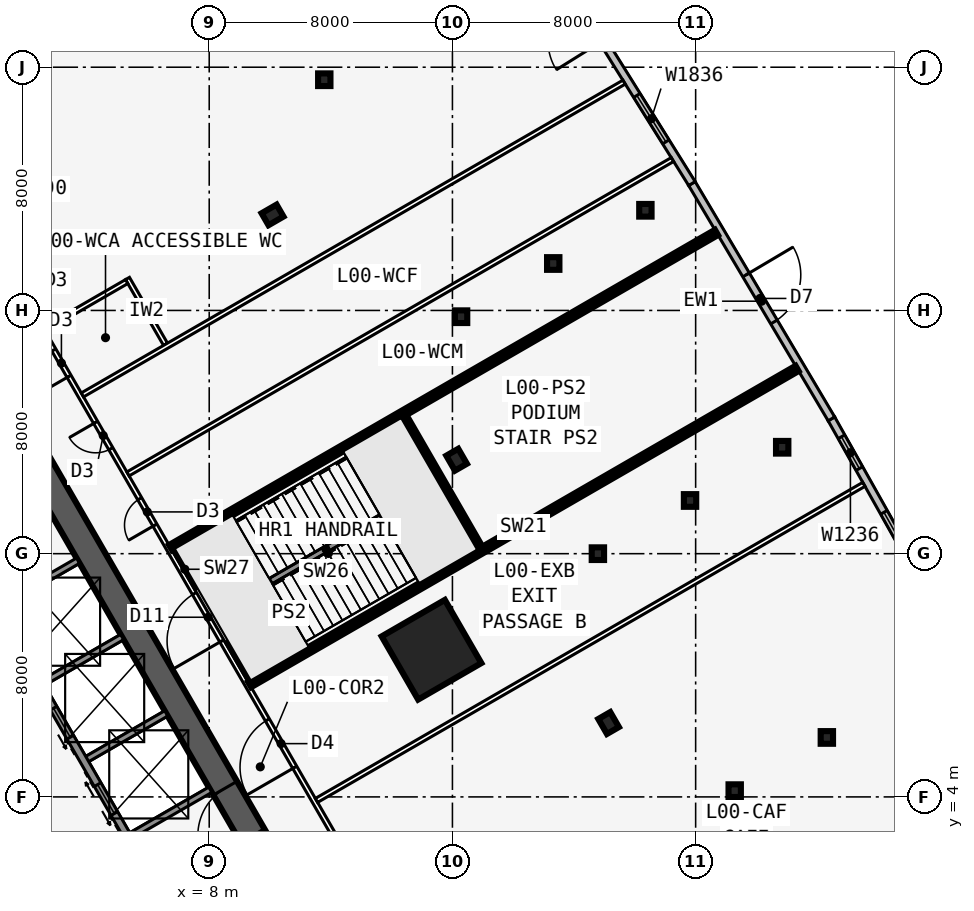
"""IFC4 building model, lengths in metres.
Left out: names, types, materials, properties, quantities, classifications, styles, units other than length and angle.
Written with IfcOpenShell. Run it as: python <this file> out.ifc"""

import sys

from ifc_helpers import new_model, si_unit, direction, frame, frame_2d, origin, origin_2d, place, context, subcontext, project, spatial, rectangle, i_section, extrude, element, fill, save


model = new_model("IFC4")
c1 = context("Model", 3, precision=1e-05, world=origin(), true_north=direction((0.0, 1.0)))
c2 = subcontext(c1, "Body", "Model", "MODEL_VIEW")
j1 = project(units=[si_unit("LENGTHUNIT", "METRE"), si_unit("PLANEANGLEUNIT", "RADIAN")], contexts=[c1])
p1 = place(None, origin())
s1 = spatial("IfcSite", under=j1, at=p1, CompositionType="ELEMENT")
p2 = place(p1, origin())
s2 = spatial("IfcBuilding", under=s1, at=p2, CompositionType="ELEMENT")
p3 = place(p2, origin())
s3 = spatial("IfcBuildingStorey", under=s2, at=p3, CompositionType="ELEMENT", Elevation=0.0)
p4 = place(p3, frame((16.5, -9.526, -0.3), z_axis=(0.0, 0.0, 1.0), x_axis=(-0.499999749417, 0.866025548458, 0.0)))
e1 = element("IfcWall", 1, at=p4, inside=s3, PredefinedType="SHEAR", context=c2, shape_type="SweptSolid", body=[
    extrude(rectangle(XDim=33.0, YDim=0.9, at=frame_2d((16.5, 0.0))), origin(), (0.0, 0.0, 1.0), 6.3),
])
p5 = place(p4, frame((14.15, 0.0, 0.3)))
e2 = element("IfcOpeningElement", 2, at=p5, cuts=e1, PredefinedType="OPENING", context=c2, shape_type="SweptSolid", body=[
    extrude(rectangle(XDim=1.8, YDim=2.13, at=frame_2d((0.9, 1.065))), frame((0.0, 0.46, 0.0), z_axis=(0.0, -1.0, 0.0), x_axis=(1.0, 0.0, 0.0)), (0.0, 0.0, 1.0), 0.92),
])
p6 = place(p4, frame((12.6, 0.0, 0.3)))
e3 = element("IfcOpeningElement", 3, at=p6, cuts=e1, PredefinedType="OPENING", context=c2, shape_type="SweptSolid", body=[
    extrude(rectangle(XDim=1.0, YDim=2.13, at=frame_2d((0.5, 1.065))), frame((0.0, 0.46, 0.0), z_axis=(0.0, -1.0, 0.0), x_axis=(1.0, 0.0, 0.0)), (0.0, 0.0, 1.0), 0.92),
])
p7 = place(p3, frame((5.379, 2.586, -0.3), z_axis=(0.0, 0.0, 1.0), x_axis=(-0.500001375892, 0.866024609411, 0.0)))
e4 = element("IfcWall", 4, at=p7, inside=s3, PredefinedType="SOLIDWALL", context=c2, shape_type="SweptSolid", body=[
    extrude(rectangle(XDim=10.633, YDim=0.25, at=frame_2d((5.316, 0.0))), origin(), (0.0, 0.0, 1.0), 6.05),
])
p8 = place(p7, frame((9.164, 0.0, 0.3)))
e5 = element("IfcOpeningElement", 5, at=p8, cuts=e4, PredefinedType="OPENING", context=c2, shape_type="SweptSolid", body=[
    extrude(rectangle(XDim=0.9, YDim=2.13, at=frame_2d((0.45, 1.065))), frame((0.0, 0.135, 0.0), z_axis=(0.0, -1.0, 0.0), x_axis=(1.0, 0.0, 0.0)), (0.0, 0.0, 1.0), 0.27),
])
p9 = place(p7, frame((1.0, 0.0, 0.3)))
e6 = element("IfcOpeningElement", 6, at=p9, cuts=e4, PredefinedType="OPENING", context=c2, shape_type="SweptSolid", body=[
    extrude(rectangle(XDim=1.1, YDim=2.13, at=frame_2d((0.55, 1.065))), frame((0.0, 0.135, 0.0), z_axis=(0.0, -1.0, 0.0), x_axis=(1.0, 0.0, 0.0)), (0.0, 0.0, 1.0), 0.27),
])
p10 = place(p7, frame((3.9, 0.0, 0.3)))
e7 = element("IfcOpeningElement", 7, at=p10, cuts=e4, PredefinedType="OPENING", context=c2, shape_type="SweptSolid", body=[
    extrude(rectangle(XDim=1.1, YDim=2.13, at=frame_2d((0.55, 1.065))), frame((0.0, 0.135, 0.0), z_axis=(0.0, -1.0, 0.0), x_axis=(1.0, 0.0, 0.0)), (0.0, 0.0, 1.0), 0.27),
])
p11 = place(p7, frame((6.8, 0.0, 0.3)))
e8 = element("IfcOpeningElement", 8, at=p11, cuts=e4, PredefinedType="OPENING", context=c2, shape_type="SweptSolid", body=[
    extrude(rectangle(XDim=1.1, YDim=2.13, at=frame_2d((0.55, 1.065))), frame((0.0, 0.135, 0.0), z_axis=(0.0, -1.0, 0.0), x_axis=(1.0, 0.0, 0.0)), (0.0, 0.0, 1.0), 0.27),
])
for number, where, z_axis, x_axis in (
    (9, (5.329, 2.673, -0.3), (0.0, 0.0, 1.0), (0.866, 0.5, 0.0)),
    (10, (3.879, 5.184, -0.3), (0.0, 0.0, 1.0), (0.866, 0.5, 0.0)),
    (11, (2.429, 7.696, -0.3), (0.0, 0.0, 1.0), (0.866, 0.5, 0.0)),
    (12, (0.979, 10.207, -0.3), (0.0, 0.0, 1.0), (0.866, 0.5, 0.0)),
):
    element("IfcWall", number, at=place(p3, frame(where, z_axis=z_axis, x_axis=x_axis)), inside=s3, PredefinedType="SOLIDWALL", context=c2, shape_type="SweptSolid", body=[
        extrude(rectangle(XDim=3.125, YDim=0.2, at=frame_2d((1.562, 0.0))), origin(), (0.0, 0.0, 1.0), 6.05),
    ])
for number, where, z_axis, x_axis in (
    (13, (21.137, 6.43, -0.3), (0.0, 0.0, 1.0), (0.866, 0.5, 0.0)),
    (14, (16.137, 15.09, -0.3), (0.0, 0.0, 1.0), (0.866, 0.5, 0.0)),
    (15, (10.083, 23.142, -0.3), (0.0, 0.0, 1.0), (-0.5, 0.866, 0.0)),
):
    element("IfcColumn", number, at=place(p3, frame(where, z_axis=z_axis, x_axis=x_axis)), inside=s3, PredefinedType="COLUMN", context=c2, shape_type="SweptSolid", body=[
        extrude(i_section(OverallWidth=0.455, OverallDepth=0.569, WebThickness=0.078, FlangeThickness=0.125, at=origin_2d()), origin(), (0.0, 0.0, 1.0), 6.3),
    ])
for number, where, z_axis, x_axis in (
    (16, (25.285, 4.206, -0.3), (0.0, 0.0, 1.0), (1.0, 0.0, 0.0)),
    (17, (20.785, 12.0, -0.3), (0.0, 0.0, 1.0), (1.0, 0.0, 0.0)),
    (18, (11.785, 27.588, -0.3), (0.0, 0.0, 1.0), (1.0, 0.0, 0.0)),
    (19, (16.285, 19.794, -0.3), (0.0, 0.0, 1.0), (1.0, 0.0, 0.0)),
    (20, (28.316, 5.956, -0.3), (0.0, 0.0, 1.0), (1.0, 0.0, 0.0)),
    (21, (23.816, 13.75, -0.3), (0.0, 0.0, 1.0), (1.0, 0.0, 0.0)),
    (22, (19.316, 21.544, -0.3), (0.0, 0.0, 1.0), (1.0, 0.0, 0.0)),
    (23, (26.847, 15.5, -0.3), (0.0, 0.0, 1.0), (1.0, 0.0, 0.0)),
    (24, (22.347, 23.294, -0.3), (0.0, 0.0, 1.0), (1.0, 0.0, 0.0)),
):
    element("IfcColumn", number, at=place(p3, frame(where, z_axis=z_axis, x_axis=x_axis)), inside=s3, PredefinedType="COLUMN", context=c2, shape_type="SweptSolid", body=[
        extrude(i_section(OverallWidth=0.406, OverallDepth=0.417, WebThickness=0.03, FlangeThickness=0.048, at=origin_2d()), origin(), (0.0, 0.0, 1.0), 6.3),
    ])
p12 = place(p3, frame((15.312, 8.84, -0.3), z_axis=(0.0, 0.0, 1.0), x_axis=(0.866025403784, 0.5, 0.0)))
e25 = element("IfcColumn", 25, at=p12, inside=s3, PredefinedType="COLUMN", context=c2, shape_type="SweptSolid", body=[
    extrude(rectangle(XDim=2.4, YDim=2.4, at=origin_2d()), origin(), (0.0, 0.0, 1.0), 6.3),
])
p13 = place(p3, frame((32.875, 8.589, -0.3), z_axis=(0.0, 0.0, 1.0), x_axis=(-0.489927657557, 0.871763093025, 0.0)))
e26 = element("IfcWall", 26, at=p13, inside=s3, PredefinedType="STANDARD", context=c2, shape_type="SweptSolid", body=[
    extrude(rectangle(XDim=9.001, YDim=0.25, at=frame_2d((4.5, 0.0))), origin(), (0.0, 0.0, 1.0), 6.05),
])
p14 = place(p13, frame((1.273, 0.0, 1.2)))
e27 = element("IfcOpeningElement", 27, at=p14, cuts=e26, PredefinedType="OPENING", context=c2, shape_type="SweptSolid", body=[
    extrude(rectangle(XDim=4.2, YDim=3.6, at=frame_2d((2.1, 1.8))), frame((0.0, 0.135, 0.0), z_axis=(0.0, -1.0, 0.0), x_axis=(1.0, 0.0, 0.0)), (0.0, 0.0, 1.0), 0.27),
])
p15 = place(p13, frame((7.123, 0.0, 1.2)))
e28 = element("IfcOpeningElement", 28, at=p15, cuts=e26, PredefinedType="OPENING", context=c2, shape_type="SweptSolid", body=[
    extrude(rectangle(XDim=1.2, YDim=3.6, at=frame_2d((0.6, 1.8))), frame((0.0, 0.135, 0.0), z_axis=(0.0, -1.0, 0.0), x_axis=(1.0, 0.0, 0.0)), (0.0, 0.0, 1.0), 0.27),
])
p16 = place(p3, frame((23.876, 24.175, -0.3), z_axis=(0.0, 0.0, 1.0), x_axis=(0.510009078305, -0.860169018302, 0.0)))
e29 = element("IfcWall", 29, at=p16, inside=s3, PredefinedType="STANDARD", context=c2, shape_type="SweptSolid", body=[
    extrude(rectangle(XDim=9.0, YDim=0.25, at=frame_2d((4.5, 0.0))), origin(), (0.0, 0.0, 1.0), 6.05),
])
p17 = place(p16, frame((3.495, 0.0, 0.3)))
e30 = element("IfcOpeningElement", 30, at=p17, cuts=e29, PredefinedType="OPENING", context=c2, shape_type="SweptSolid", body=[
    extrude(rectangle(XDim=1.8, YDim=2.7, at=frame_2d((0.9, 1.35))), frame((0.0, 0.135, 0.0), z_axis=(0.0, -1.0, 0.0), x_axis=(1.0, 0.0, 0.0)), (0.0, 0.0, 1.0), 0.27),
])
p18 = place(p3, frame((23.877, 24.173, -0.3), z_axis=(0.0, 0.0, 1.0), x_axis=(-0.529864906428, 0.848082060261, 0.0)))
e31 = element("IfcWall", 31, at=p18, inside=s3, PredefinedType="STANDARD", context=c2, shape_type="SweptSolid", body=[
    extrude(rectangle(XDim=9.006, YDim=0.25, at=frame_2d((4.503, 0.0))), origin(), (0.0, 0.0, 1.0), 6.05),
])
p19 = place(p18, frame((1.617, 0.0, 1.2)))
e32 = element("IfcOpeningElement", 32, at=p19, cuts=e31, PredefinedType="OPENING", context=c2, shape_type="SweptSolid", body=[
    extrude(rectangle(XDim=1.8, YDim=3.6, at=frame_2d((0.9, 1.8))), frame((0.0, 0.135, 0.0), z_axis=(0.0, -1.0, 0.0), x_axis=(1.0, 0.0, 0.0)), (0.0, 0.0, 1.0), 0.27),
])
p20 = place(p18, frame((5.537, 0.0, 0.3)))
e33 = element("IfcOpeningElement", 33, at=p20, cuts=e31, PredefinedType="OPENING", context=c2, shape_type="SweptSolid", body=[
    extrude(rectangle(XDim=1.8, YDim=2.7, at=frame_2d((0.9, 1.35))), frame((0.0, 0.135, 0.0), z_axis=(0.0, -1.0, 0.0), x_axis=(1.0, 0.0, 0.0)), (0.0, 0.0, 1.0), 0.27),
])
p21 = place(p3, frame((20.027, -10.985, -0.3), z_axis=(0.0, 0.0, 1.0), x_axis=(-0.500001677587, 0.866024435227, 0.0)))
e34 = element("IfcWall", 34, at=p21, inside=s3, PredefinedType="PARTITIONING", context=c2, shape_type="SweptSolid", body=[
    extrude(rectangle(XDim=39.054, YDim=0.15, at=frame_2d((19.527, 0.0))), origin(), (0.0, 0.0, 1.0), 5.108),
])
p22 = place(p21, frame((8.427, 0.0, 0.3)))
e35 = element("IfcOpeningElement", 35, at=p22, cuts=e34, PredefinedType="OPENING", context=c2, shape_type="SweptSolid", body=[
    extrude(rectangle(XDim=1.8, YDim=2.13, at=frame_2d((0.9, 1.065))), frame((0.0, 0.085, 0.0), z_axis=(0.0, -1.0, 0.0), x_axis=(1.0, 0.0, 0.0)), (0.0, 0.0, 1.0), 0.17),
])
p23 = place(p21, frame((18.427, 0.0, 0.3)))
e36 = element("IfcOpeningElement", 36, at=p23, cuts=e34, PredefinedType="OPENING", context=c2, shape_type="SweptSolid", body=[
    extrude(rectangle(XDim=1.8, YDim=2.13, at=frame_2d((0.9, 1.065))), frame((0.0, 0.085, 0.0), z_axis=(0.0, -1.0, 0.0), x_axis=(1.0, 0.0, 0.0)), (0.0, 0.0, 1.0), 0.17),
])
p24 = place(p21, frame((23.227, 0.0, 0.3)))
e37 = element("IfcOpeningElement", 37, at=p24, cuts=e34, PredefinedType="OPENING", context=c2, shape_type="SweptSolid", body=[
    extrude(rectangle(XDim=1.8, YDim=2.13, at=frame_2d((0.9, 1.065))), frame((0.0, 0.085, 0.0), z_axis=(0.0, -1.0, 0.0), x_axis=(1.0, 0.0, 0.0)), (0.0, 0.0, 1.0), 0.17),
])
p25 = place(p21, frame((27.627, 0.0, 0.3)))
e38 = element("IfcOpeningElement", 38, at=p25, cuts=e34, PredefinedType="OPENING", context=c2, shape_type="SweptSolid", body=[
    extrude(rectangle(XDim=1.0, YDim=2.13, at=frame_2d((0.5, 1.065))), frame((0.0, 0.085, 0.0), z_axis=(0.0, -1.0, 0.0), x_axis=(1.0, 0.0, 0.0)), (0.0, 0.0, 1.0), 0.17),
])
p26 = place(p21, frame((30.527, 0.0, 0.3)))
e39 = element("IfcOpeningElement", 39, at=p26, cuts=e34, PredefinedType="OPENING", context=c2, shape_type="SweptSolid", body=[
    extrude(rectangle(XDim=1.0, YDim=2.13, at=frame_2d((0.5, 1.065))), frame((0.0, 0.085, 0.0), z_axis=(0.0, -1.0, 0.0), x_axis=(1.0, 0.0, 0.0)), (0.0, 0.0, 1.0), 0.17),
])
p27 = place(p21, frame((33.277, 0.0, 0.3)))
e40 = element("IfcOpeningElement", 40, at=p27, cuts=e34, PredefinedType="OPENING", context=c2, shape_type="SweptSolid", body=[
    extrude(rectangle(XDim=1.0, YDim=2.13, at=frame_2d((0.5, 1.065))), frame((0.0, 0.085, 0.0), z_axis=(0.0, -1.0, 0.0), x_axis=(1.0, 0.0, 0.0)), (0.0, 0.0, 1.0), 0.17),
])
p28 = place(p21, frame((36.39, 0.0, 0.3)))
e41 = element("IfcOpeningElement", 41, at=p28, cuts=e34, PredefinedType="OPENING", context=c2, shape_type="SweptSolid", body=[
    extrude(rectangle(XDim=1.0, YDim=2.13, at=frame_2d((0.5, 1.065))), frame((0.0, 0.085, 0.0), z_axis=(0.0, -1.0, 0.0), x_axis=(1.0, 0.0, 0.0)), (0.0, 0.0, 1.0), 0.17),
])
p29 = place(p3, frame((11.529, 3.885, -0.3), z_axis=(0.0, 0.0, 1.0), x_axis=(0.866024642576, 0.500001318449, 0.0)))
e42 = element("IfcWall", 42, at=p29, inside=s3, PredefinedType="PARTITIONING", context=c2, shape_type="SweptSolid", body=[
    extrude(rectangle(XDim=20.79, YDim=0.15, at=frame_2d((10.395, 0.0))), origin(), (0.0, 0.0, 1.0), 6.05),
])
p30 = place(p3, frame((9.329, 7.695, -0.3), z_axis=(0.0, 0.0, 1.0), x_axis=(0.866025850686, 0.499999225942, 0.0)))
e43 = element("IfcWall", 43, at=p30, inside=s3, PredefinedType="SHEAR", context=c2, shape_type="SweptSolid", body=[
    extrude(rectangle(XDim=20.794, YDim=0.2, at=frame_2d((10.397, 0.0))), origin(), (0.0, 0.0, 1.0), 6.3),
])
p31 = place(p3, frame((6.729, 12.198, -0.3), z_axis=(0.0, 0.0, 1.0), x_axis=(0.866025976348, 0.499999008289, 0.0)))
e44 = element("IfcWall", 44, at=p31, inside=s3, PredefinedType="SHEAR", context=c2, shape_type="SweptSolid", body=[
    extrude(rectangle(XDim=20.734, YDim=0.2, at=frame_2d((10.367, 0.0))), origin(), (0.0, 0.0, 1.0), 6.3),
])
p32 = place(p3, frame((5.329, 14.623, -0.3), z_axis=(0.0, 0.0, 1.0), x_axis=(0.866021414031, 0.500006910393, 0.0)))
e45 = element("IfcWall", 45, at=p32, inside=s3, PredefinedType="PARTITIONING", context=c2, shape_type="SweptSolid", body=[
    extrude(rectangle(XDim=20.678, YDim=0.15, at=frame_2d((10.339, 0.0))), origin(), (0.0, 0.0, 1.0), 5.108),
])
p33 = place(p3, frame((3.829, 17.221, -0.3), z_axis=(0.0, 0.0, 1.0), x_axis=(0.866020381737, 0.50000869834, 0.0)))
e46 = element("IfcWall", 46, at=p33, inside=s3, PredefinedType="PARTITIONING", context=c2, shape_type="SweptSolid", body=[
    extrude(rectangle(XDim=20.574, YDim=0.15, at=frame_2d((10.287, 0.0))), origin(), (0.0, 0.0, 1.0), 6.05),
])
p34 = place(p3, frame((6.562, 18.886, -0.3), z_axis=(0.0, 0.0, 1.0), x_axis=(-0.500004234368, 0.866022959057, 0.0)))
e47 = element("IfcWall", 47, at=p34, inside=s3, PredefinedType="PARTITIONING", context=c2, shape_type="SweptSolid", body=[
    extrude(rectangle(XDim=2.5, YDim=0.15, at=frame_2d((1.25, 0.0))), origin(), (0.0, 0.0, 1.0), 6.05),
])
p35 = place(p3, frame((2.579, 19.386, -0.3), z_axis=(0.0, 0.0, 1.0), x_axis=(0.866022959057, 0.500004234368, 0.0)))
e48 = element("IfcWall", 48, at=p35, inside=s3, PredefinedType="PARTITIONING", context=c2, shape_type="SweptSolid", body=[
    extrude(rectangle(XDim=3.125, YDim=0.15, at=frame_2d((1.562, 0.0))), origin(), (0.0, 0.0, 1.0), 6.05),
])
p36 = place(p3, frame((16.949, 12.095, -0.3), z_axis=(0.0, 0.0, 1.0), x_axis=(-0.499992051641, 0.866029992723, 0.0)))
e49 = element("IfcWall", 49, at=p36, inside=s3, PredefinedType="SHEAR", context=c2, shape_type="SweptSolid", body=[
    extrude(rectangle(XDim=5.2, YDim=0.2, at=frame_2d((2.6, 0.0))), origin(), (0.0, 0.0, 1.0), 6.3),
])
p37 = place(p3, frame((9.322, 7.807, -0.3), z_axis=(0.0, 0.0, 1.0), x_axis=(-0.500060622324, 0.86599040064, 0.0)))
e50 = element("IfcWall", 50, at=p37, inside=s3, PredefinedType="SOLIDWALL", context=c2, shape_type="SweptSolid", body=[
    extrude(rectangle(XDim=1.5, YDim=0.1, at=frame_2d((0.75, 0.0))), origin(), (0.0, 0.0, 1.0), 6.3),
])
p38 = place(p3, frame((7.572, 10.838, -0.3), z_axis=(0.0, 0.0, 1.0), x_axis=(-0.499990139034, 0.866031096941, 0.0)))
e51 = element("IfcWall", 51, at=p38, inside=s3, PredefinedType="SOLIDWALL", context=c2, shape_type="SweptSolid", body=[
    extrude(rectangle(XDim=1.5, YDim=0.1, at=frame_2d((0.75, 0.0))), origin(), (0.0, 0.0, 1.0), 6.3),
])
p39 = place(p3, frame((10.023, 11.098, 0.0), z_axis=(0.0, 0.0, 1.0), x_axis=(0.866031452229, 0.49998952364, 0.0)))
e52 = element("IfcWall", 52, at=p39, inside=s3, PredefinedType="SOLIDWALL", context=c2, shape_type="SweptSolid", body=[
    extrude(rectangle(XDim=4.194, YDim=0.2, at=frame_2d((2.097, 0.0))), origin(), (0.0, 0.0, 1.0), 6.0),
])
p40 = place(p14, origin())
e53 = element("IfcWindow", 53, at=p40, inside=s3, PartitioningType="SINGLE_PANEL", PredefinedType="WINDOW", context=c2, shape_type="SweptSolid", body=[
    extrude(rectangle(XDim=4.2, YDim=3.6, at=frame_2d((2.1, 1.8))), frame((0.0, 0.03, 0.0), z_axis=(0.0, -1.0, 0.0), x_axis=(1.0, 0.0, 0.0)), (0.0, 0.0, 1.0), 0.06),
])
fill(e27, e53)
p41 = place(p15, origin())
e54 = element("IfcWindow", 54, at=p41, inside=s3, PartitioningType="SINGLE_PANEL", PredefinedType="WINDOW", context=c2, shape_type="SweptSolid", body=[
    extrude(rectangle(XDim=1.2, YDim=3.6, at=frame_2d((0.6, 1.8))), frame((0.0, 0.03, 0.0), z_axis=(0.0, -1.0, 0.0), x_axis=(1.0, 0.0, 0.0)), (0.0, 0.0, 1.0), 0.06),
])
fill(e28, e54)
p42 = place(p17, origin())
e55 = element("IfcDoor", 55, at=p42, inside=s3, OperationType="DOUBLE_DOOR_SINGLE_SWING", PredefinedType="DOOR", context=c2, shape_type="SweptSolid", body=[
    extrude(rectangle(XDim=1.8, YDim=2.7, at=frame_2d((0.9, 1.35))), frame((0.0, 0.025, 0.0), z_axis=(0.0, -1.0, 0.0), x_axis=(1.0, 0.0, 0.0)), (0.0, 0.0, 1.0), 0.05),
])
fill(e30, e55)
p43 = place(p19, origin())
e56 = element("IfcWindow", 56, at=p43, inside=s3, PartitioningType="SINGLE_PANEL", PredefinedType="WINDOW", context=c2, shape_type="SweptSolid", body=[
    extrude(rectangle(XDim=1.8, YDim=3.6, at=frame_2d((0.9, 1.8))), frame((0.0, 0.03, 0.0), z_axis=(0.0, -1.0, 0.0), x_axis=(1.0, 0.0, 0.0)), (0.0, 0.0, 1.0), 0.06),
])
fill(e32, e56)
p44 = place(p23, origin())
e57 = element("IfcDoor", 57, at=p44, inside=s3, OperationType="DOUBLE_DOOR_SINGLE_SWING", PredefinedType="DOOR", context=c2, shape_type="SweptSolid", body=[
    extrude(rectangle(XDim=1.8, YDim=2.13, at=frame_2d((0.9, 1.065))), frame((0.0, 0.025, 0.0), z_axis=(0.0, -1.0, 0.0), x_axis=(1.0, 0.0, 0.0)), (0.0, 0.0, 1.0), 0.05),
])
fill(e36, e57)
p45 = place(p24, origin())
e58 = element("IfcDoor", 58, at=p45, inside=s3, OperationType="DOUBLE_DOOR_SINGLE_SWING", PredefinedType="DOOR", context=c2, shape_type="SweptSolid", body=[
    extrude(rectangle(XDim=1.8, YDim=2.13, at=frame_2d((0.9, 1.065))), frame((0.0, 0.025, 0.0), z_axis=(0.0, -1.0, 0.0), x_axis=(1.0, 0.0, 0.0)), (0.0, 0.0, 1.0), 0.05),
])
fill(e37, e58)
p46 = place(p25, origin())
e59 = element("IfcDoor", 59, at=p46, inside=s3, OperationType="SINGLE_SWING_LEFT", PredefinedType="DOOR", context=c2, shape_type="SweptSolid", body=[
    extrude(rectangle(XDim=1.0, YDim=2.13, at=frame_2d((0.5, 1.065))), frame((0.0, 0.025, 0.0), z_axis=(0.0, -1.0, 0.0), x_axis=(1.0, 0.0, 0.0)), (0.0, 0.0, 1.0), 0.05),
])
fill(e38, e59)
p47 = place(p26, origin())
e60 = element("IfcDoor", 60, at=p47, inside=s3, OperationType="SINGLE_SWING_RIGHT", PredefinedType="DOOR", context=c2, shape_type="SweptSolid", body=[
    extrude(rectangle(XDim=1.0, YDim=2.13, at=frame_2d((0.5, 1.065))), frame((0.0, 0.025, 0.0), z_axis=(0.0, -1.0, 0.0), x_axis=(1.0, 0.0, 0.0)), (0.0, 0.0, 1.0), 0.05),
])
fill(e39, e60)
p48 = place(p27, origin())
e61 = element("IfcDoor", 61, at=p48, inside=s3, OperationType="SINGLE_SWING_LEFT", PredefinedType="DOOR", context=c2, shape_type="SweptSolid", body=[
    extrude(rectangle(XDim=1.0, YDim=2.13, at=frame_2d((0.5, 1.065))), frame((0.0, 0.025, 0.0), z_axis=(0.0, -1.0, 0.0), x_axis=(1.0, 0.0, 0.0)), (0.0, 0.0, 1.0), 0.05),
])
fill(e40, e61)
p49 = place(p5, origin())
e62 = element("IfcDoor", 62, at=p49, inside=s3, OperationType="DOUBLE_DOOR_SINGLE_SWING", PredefinedType="DOOR", context=c2, shape_type="SweptSolid", body=[
    extrude(rectangle(XDim=1.8, YDim=2.13, at=frame_2d((0.9, 1.065))), frame((0.0, 0.025, 0.0), z_axis=(0.0, -1.0, 0.0), x_axis=(1.0, 0.0, 0.0)), (0.0, 0.0, 1.0), 0.05),
])
fill(e2, e62)
p50 = place(p9, origin())
e63 = element("IfcDoor", 63, at=p50, inside=s3, OperationType="DOUBLE_DOOR_SLIDING", PredefinedType="USERDEFINED", context=c2, shape_type="SweptSolid", body=[
    extrude(rectangle(XDim=1.1, YDim=2.13, at=frame_2d((0.55, 1.065))), frame((0.0, 0.025, 0.0), z_axis=(0.0, -1.0, 0.0), x_axis=(1.0, 0.0, 0.0)), (0.0, 0.0, 1.0), 0.05),
])
fill(e6, e63)
p51 = place(p10, origin())
e64 = element("IfcDoor", 64, at=p51, inside=s3, OperationType="DOUBLE_DOOR_SLIDING", PredefinedType="USERDEFINED", context=c2, shape_type="SweptSolid", body=[
    extrude(rectangle(XDim=1.1, YDim=2.13, at=frame_2d((0.55, 1.065))), frame((0.0, 0.025, 0.0), z_axis=(0.0, -1.0, 0.0), x_axis=(1.0, 0.0, 0.0)), (0.0, 0.0, 1.0), 0.05),
])
fill(e7, e64)
save(model, sys.argv[1])
